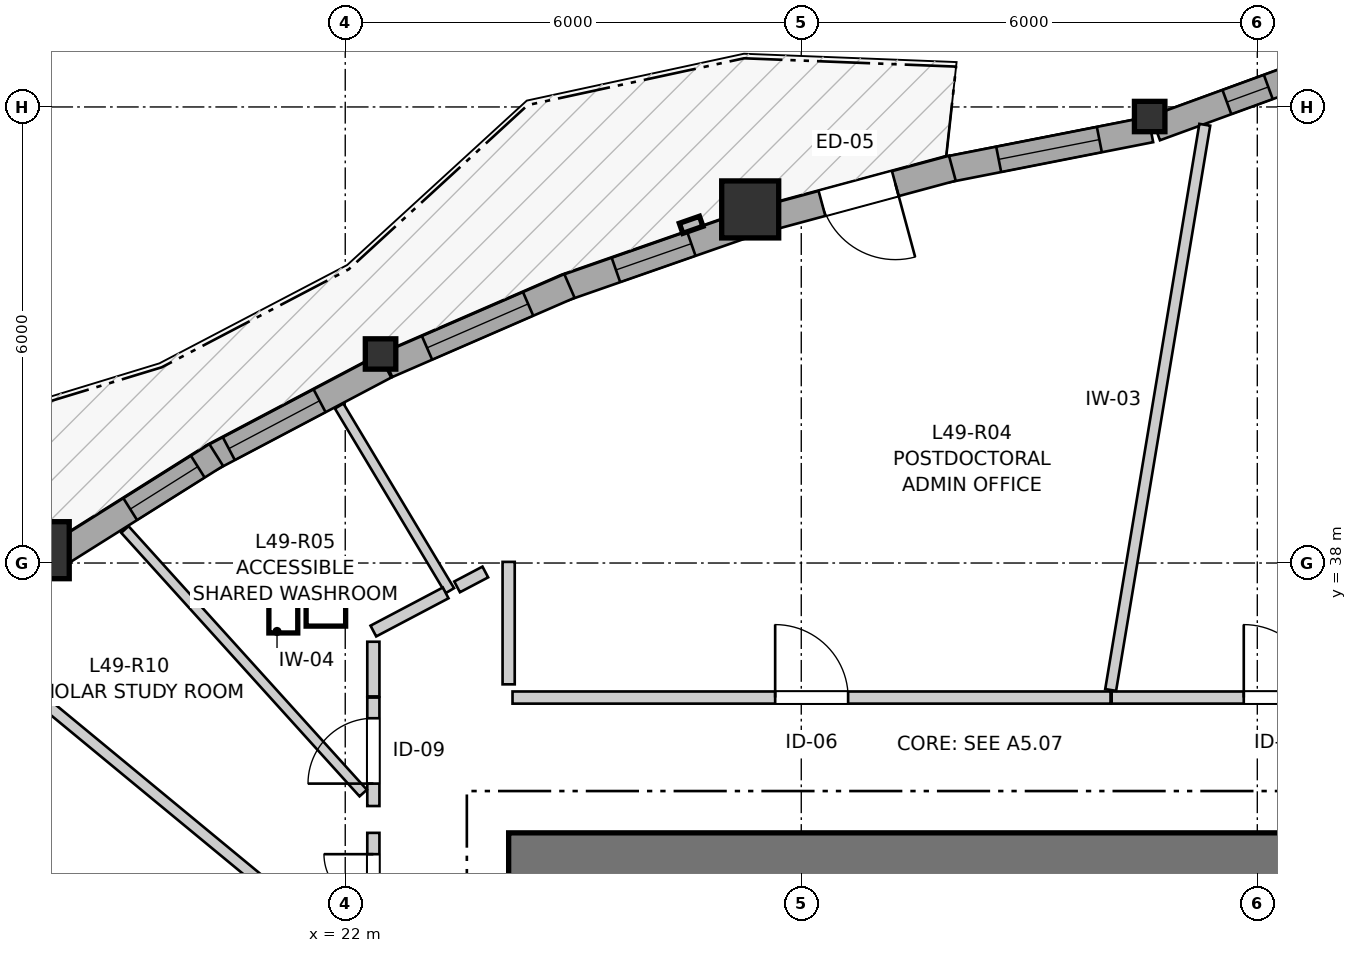
"""IFC4 building model, lengths in metres.
Left out: names, types, materials, properties, quantities, classifications, styles, units other than length and angle.
Written with IfcOpenShell. Run it as: python <this file> out.ifc"""

import sys

from ifc_helpers import new_model, si_unit, direction, frame, frame_2d, origin, origin_2d, place, context, subcontext, project, spatial, rectangle, i_section, extrude, source, transform, mapped, element, fill, save


model = new_model("IFC4")
c1 = context("Model", 3, precision=1e-05, world=origin(), true_north=direction((0.0, 1.0)))
c2 = subcontext(c1, "Body", "Model", "MODEL_VIEW")
j1 = project(units=[si_unit("LENGTHUNIT", "METRE"), si_unit("PLANEANGLEUNIT", "RADIAN")], contexts=[c1])
p1 = place(None, origin())
s1 = spatial("IfcSite", under=j1, at=p1, CompositionType="ELEMENT")
p2 = place(p1, origin())
s2 = spatial("IfcBuilding", under=s1, at=p2, CompositionType="ELEMENT")
p3 = place(p2, frame((0.0, 0.0, 165.0)))
s3 = spatial("IfcBuildingStorey", under=s2, at=p3, CompositionType="ELEMENT", Elevation=165.0)
p4 = place(p3, frame((36.55, 34.125, 0.0), z_axis=(0.0, 0.0, 1.0), x_axis=(-1.0, 0.0, 0.0)))
e1 = element("IfcWall", 1, at=p4, inside=s3, PredefinedType="SHEAR", context=c2, shape_type="SweptSolid", body=[
    extrude(rectangle(XDim=12.4, YDim=0.65, at=frame_2d((6.2, 0.0))), origin(), (0.0, 0.0, 1.0), 2.95),
])
m1 = source(origin(), c2, "Body", "SweptSolid", [
    extrude(i_section(OverallWidth=0.401, OverallDepth=0.399, WebThickness=0.023, FlangeThickness=0.036, FilletRadius=0.015, at=origin_2d()), origin(), (0.0, 0.0, 1.0), 2.95),
])
p5 = place(p3, frame((32.584, 43.874, 0.0), z_axis=(0.0, 0.0, 1.0), x_axis=(1.0, 0.0, 0.0)))
e2 = element("IfcColumn", 2, at=p5, inside=s3, PredefinedType="PILASTER", context=c2, shape_type="MappedRepresentation", body=[
    mapped(m1, transform((0.0, 0.0, 0.0), x_axis=(1.0, 0.0, 0.0), y_axis=(0.0, 1.0, 0.0), z_axis=(0.0, 0.0, 1.0), scale=1.0)),
])
m2 = source(origin(), c2, "Body", "SweptSolid", [
    extrude(rectangle(XDim=0.75, YDim=0.75, at=origin_2d()), origin(), (0.0, 0.0, 1.0), 2.95),
])
p6 = place(p3, frame((27.328, 42.652, 0.0), z_axis=(0.0, 0.0, 1.0), x_axis=(1.0, 0.0, 0.0)))
e3 = element("IfcColumn", 3, at=p6, inside=s3, PredefinedType="COLUMN", context=c2, shape_type="MappedRepresentation", body=[
    mapped(m2, transform((0.0, 0.0, 0.0), x_axis=(1.0, 0.0, 0.0), y_axis=(0.0, 1.0, 0.0), z_axis=(0.0, 0.0, 1.0), scale=1.0)),
])
p7 = place(p3, frame((22.465, 40.75, 0.0), z_axis=(0.0, 0.0, 1.0), x_axis=(1.0, 0.0, 0.0)))
e4 = element("IfcColumn", 4, at=p7, inside=s3, PredefinedType="PILASTER", context=c2, shape_type="MappedRepresentation", body=[
    mapped(m1, transform((0.0, 0.0, 0.0), x_axis=(1.0, 0.0, 0.0), y_axis=(0.0, 1.0, 0.0), z_axis=(0.0, 0.0, 1.0), scale=1.0)),
])
p8 = place(p3, frame((17.994, 38.169, 0.0), z_axis=(0.0, 0.0, 1.0), x_axis=(1.0, 0.0, 0.0)))
e5 = element("IfcColumn", 5, at=p8, inside=s3, PredefinedType="COLUMN", context=c2, shape_type="MappedRepresentation", body=[
    mapped(m2, transform((0.0, 0.0, 0.0), x_axis=(1.0, 0.0, 0.0), y_axis=(0.0, 1.0, 0.0), z_axis=(0.0, 0.0, 1.0), scale=1.0)),
])
p9 = place(p3, frame((34.562, 44.415, 0.0), z_axis=(0.0, 0.0, 1.0), x_axis=(-0.939426417976, -0.342750645819, 0.0)))
e6 = element("IfcWall", 6, at=p9, inside=s3, PredefinedType="SOLIDWALL", context=c2, shape_type="SweptSolid", body=[
    extrude(rectangle(XDim=2.023, YDim=0.34, at=frame_2d((1.011, 0.0))), origin(), (0.0, 0.0, 1.0), 2.53),
])
p10 = place(p9, frame((0.444, 0.0, 0.82)))
e7 = element("IfcOpeningElement", 7, at=p10, cuts=e6, PredefinedType="OPENING", context=c2, shape_type="SweptSolid", body=[
    extrude(rectangle(XDim=0.58, YDim=1.35, at=frame_2d((0.29, 0.675))), frame((0.0, 0.18, 0.0), z_axis=(0.0, -1.0, 0.0), x_axis=(1.0, 0.0, 0.0)), (0.0, 0.0, 1.0), 0.36),
])
p11 = place(p3, frame((32.597, 43.704, 0.0), z_axis=(0.0, 0.0, 1.0), x_axis=(-0.981214876679, -0.192918028667, 0.0)))
e8 = element("IfcWall", 8, at=p11, inside=s3, PredefinedType="SOLIDWALL", context=c2, shape_type="SweptSolid", body=[
    extrude(rectangle(XDim=2.746, YDim=0.34, at=frame_2d((1.373, 0.0))), origin(), (0.0, 0.0, 1.0), 2.53),
])
p12 = place(p11, frame((0.688, 0.0, 0.82)))
e9 = element("IfcOpeningElement", 9, at=p12, cuts=e8, PredefinedType="OPENING", context=c2, shape_type="SweptSolid", body=[
    extrude(rectangle(XDim=1.35, YDim=1.45, at=frame_2d((0.675, 0.725))), frame((0.0, 0.18, 0.0), z_axis=(0.0, -1.0, 0.0), x_axis=(1.0, 0.0, 0.0)), (0.0, 0.0, 1.0), 0.36),
])
p13 = place(p3, frame((29.988, 43.194, 0.0), z_axis=(0.0, 0.0, 1.0), x_axis=(-0.965459623591, -0.26055271101, 0.0)))
e10 = element("IfcWall", 10, at=p13, inside=s3, PredefinedType="SOLIDWALL", context=c2, shape_type="SweptSolid", body=[
    extrude(rectangle(XDim=2.554, YDim=0.34, at=frame_2d((1.277, 0.0))), origin(), (0.0, 0.0, 1.0), 2.53),
])
p14 = place(p13, frame((0.777, 0.0, 0.0)))
e11 = element("IfcOpeningElement", 11, at=p14, cuts=e10, PredefinedType="OPENING", context=c2, shape_type="SweptSolid", body=[
    extrude(rectangle(XDim=1.0, YDim=2.1, at=frame_2d((0.5, 1.05))), frame((0.0, 0.18, 0.0), z_axis=(0.0, -1.0, 0.0), x_axis=(1.0, 0.0, 0.0)), (0.0, 0.0, 1.0), 0.36),
])
p15 = place(p3, frame((27.238, 42.44, 0.0), z_axis=(0.0, 0.0, 1.0), x_axis=(-0.944135459374, -0.329557634341, 0.0)))
e12 = element("IfcWall", 12, at=p15, inside=s3, PredefinedType="SOLIDWALL", context=c2, shape_type="SweptSolid", body=[
    extrude(rectangle(XDim=2.51, YDim=0.34, at=frame_2d((1.255, 0.0))), origin(), (0.0, 0.0, 1.0), 2.53),
])
p16 = place(p15, frame((0.725, 0.0, 0.82)))
e13 = element("IfcOpeningElement", 13, at=p16, cuts=e12, PredefinedType="OPENING", context=c2, shape_type="SweptSolid", body=[
    extrude(rectangle(XDim=1.05, YDim=1.45, at=frame_2d((0.525, 0.725))), frame((0.0, 0.18, 0.0), z_axis=(0.0, -1.0, 0.0), x_axis=(1.0, 0.0, 0.0)), (0.0, 0.0, 1.0), 0.36),
])
p17 = place(p3, frame((24.95, 41.645, 0.0), z_axis=(0.0, 0.0, 1.0), x_axis=(-0.917090826553, -0.398678336322, 0.0)))
e14 = element("IfcWall", 14, at=p17, inside=s3, PredefinedType="SOLIDWALL", context=c2, shape_type="SweptSolid", body=[
    extrude(rectangle(XDim=2.616, YDim=0.34, at=frame_2d((1.308, 0.0))), origin(), (0.0, 0.0, 1.0), 2.53),
])
p18 = place(p17, frame((0.593, 0.0, 0.82)))
e15 = element("IfcOpeningElement", 15, at=p18, cuts=e14, PredefinedType="OPENING", context=c2, shape_type="SweptSolid", body=[
    extrude(rectangle(XDim=1.45, YDim=1.25, at=frame_2d((0.725, 0.625))), frame((0.0, 0.18, 0.0), z_axis=(0.0, -1.0, 0.0), x_axis=(1.0, 0.0, 0.0)), (0.0, 0.0, 1.0), 0.36),
])
p19 = place(p3, frame((22.526, 40.591, 0.0), z_axis=(0.0, 0.0, 1.0), x_axis=(-0.884394438343, -0.46674026763, 0.0)))
e16 = element("IfcWall", 16, at=p19, inside=s3, PredefinedType="SOLIDWALL", context=c2, shape_type="SweptSolid", body=[
    extrude(rectangle(XDim=2.601, YDim=0.34, at=frame_2d((1.301, 0.0))), origin(), (0.0, 0.0, 1.0), 2.53),
])
p20 = place(p19, frame((0.977, 0.0, 0.82)))
e17 = element("IfcOpeningElement", 17, at=p20, cuts=e16, PredefinedType="OPENING", context=c2, shape_type="SweptSolid", body=[
    extrude(rectangle(XDim=1.35, YDim=1.45, at=frame_2d((0.675, 0.725))), frame((0.0, 0.18, 0.0), z_axis=(0.0, -1.0, 0.0), x_axis=(1.0, 0.0, 0.0)), (0.0, 0.0, 1.0), 0.36),
])
p21 = place(p3, frame((20.303, 39.421, 0.0), z_axis=(0.0, 0.0, 1.0), x_axis=(-0.846381586821, -0.532576951707, 0.0)))
e18 = element("IfcWall", 18, at=p21, inside=s3, PredefinedType="SOLIDWALL", context=c2, shape_type="SweptSolid", body=[
    extrude(rectangle(XDim=2.466, YDim=0.34, at=frame_2d((1.233, 0.0))), origin(), (0.0, 0.0, 1.0), 2.53),
])
p22 = place(p21, frame((0.287, 0.0, 0.82)))
e19 = element("IfcOpeningElement", 19, at=p22, cuts=e18, PredefinedType="OPENING", context=c2, shape_type="SweptSolid", body=[
    extrude(rectangle(XDim=1.05, YDim=1.45, at=frame_2d((0.525, 0.725))), frame((0.0, 0.18, 0.0), z_axis=(0.0, -1.0, 0.0), x_axis=(1.0, 0.0, 0.0)), (0.0, 0.0, 1.0), 0.36),
])
p23 = place(p3, frame((24.201, 36.23, 0.0), z_axis=(0.0, 0.0, 1.0), x_axis=(1.0, 0.0, 0.0)))
e20 = element("IfcWall", 20, at=p23, inside=s3, PredefinedType="PARTITIONING", context=c2, shape_type="SweptSolid", body=[
    extrude(rectangle(XDim=7.868, YDim=0.16, at=frame_2d((3.934, 0.0))), origin(), (0.0, 0.0, 1.0), 2.95),
])
p24 = place(p23, frame((3.456, 0.0, 0.0)))
e21 = element("IfcOpeningElement", 21, at=p24, cuts=e20, PredefinedType="OPENING", context=c2, shape_type="SweptSolid", body=[
    extrude(rectangle(XDim=0.96, YDim=2.1, at=frame_2d((0.48, 1.05))), frame((0.0, 0.09, 0.0), z_axis=(0.0, -1.0, 0.0), x_axis=(1.0, 0.0, 0.0)), (0.0, 0.0, 1.0), 0.18),
])
p25 = place(p3, frame((32.084, 36.23, 0.0), z_axis=(0.0, 0.0, 1.0), x_axis=(1.0, 0.0, 0.0)))
e22 = element("IfcWall", 22, at=p25, inside=s3, PredefinedType="PARTITIONING", context=c2, shape_type="SweptSolid", body=[
    extrude(rectangle(XDim=4.466, YDim=0.16, at=frame_2d((2.233, 0.0))), origin(), (0.0, 0.0, 1.0), 2.588),
])
p26 = place(p25, frame((1.738, 0.0, 0.0)))
e23 = element("IfcOpeningElement", 23, at=p26, cuts=e22, PredefinedType="OPENING", context=c2, shape_type="SweptSolid", body=[
    extrude(rectangle(XDim=0.96, YDim=2.1, at=frame_2d((0.48, 1.05))), frame((0.0, 0.09, 0.0), z_axis=(0.0, -1.0, 0.0), x_axis=(1.0, 0.0, 0.0)), (0.0, 0.0, 1.0), 0.18),
])
p27 = place(p3, frame((22.37, 32.624, 0.0), z_axis=(0.0, 0.0, 1.0), x_axis=(0.0, 1.0, 0.0)))
e24 = element("IfcWall", 24, at=p27, inside=s3, PredefinedType="PARTITIONING", context=c2, shape_type="SweptSolid", body=[
    extrude(rectangle(XDim=1.826, YDim=0.16, at=frame_2d((0.913, 0.0))), origin(), (0.0, 0.0, 1.0), 2.95),
])
p28 = place(p27, frame((0.246, 0.0, 0.0)))
e25 = element("IfcOpeningElement", 25, at=p28, cuts=e24, PredefinedType="OPENING", context=c2, shape_type="SweptSolid", body=[
    extrude(rectangle(XDim=1.3, YDim=2.1, at=frame_2d((0.65, 1.05))), frame((0.0, 0.09, 0.0), z_axis=(0.0, -1.0, 0.0), x_axis=(1.0, 0.0, 0.0)), (0.0, 0.0, 1.0), 0.18),
])
p29 = place(p3, frame((22.37, 34.803, 0.0), z_axis=(0.0, 0.0, 1.0), x_axis=(0.0, 1.0, 0.0)))
e26 = element("IfcWall", 26, at=p29, inside=s3, PredefinedType="PARTITIONING", context=c2, shape_type="SweptSolid", body=[
    extrude(rectangle(XDim=1.427, YDim=0.16, at=frame_2d((0.713, 0.0))), origin(), (0.0, 0.0, 1.0), 2.95),
])
p30 = place(p29, frame((0.295, 0.0, 0.0)))
e27 = element("IfcOpeningElement", 27, at=p30, cuts=e26, PredefinedType="OPENING", context=c2, shape_type="SweptSolid", body=[
    extrude(rectangle(XDim=0.86, YDim=2.05, at=frame_2d((0.43, 1.025))), frame((0.0, 0.09, 0.0), z_axis=(0.0, -1.0, 0.0), x_axis=(1.0, 0.0, 0.0)), (0.0, 0.0, 1.0), 0.18),
])
p31 = place(p3, frame((32.071, 36.33, 0.0), z_axis=(0.0, 0.0, 1.0), x_axis=(0.164299199522, 0.986410549942, 0.0)))
e28 = element("IfcWall", 28, at=p31, inside=s3, PredefinedType="PARTITIONING", context=c2, shape_type="SweptSolid", body=[
    extrude(rectangle(XDim=7.538, YDim=0.145, at=frame_2d((3.769, 0.0))), origin(), (0.0, 0.0, 1.0), 2.95),
])
p32 = place(p3, frame((17.028, 37.0, 0.0), z_axis=(0.0, 0.0, 1.0), x_axis=(0.771119105053, -0.636690918596, 0.0)))
e29 = element("IfcWall", 29, at=p32, inside=s3, PredefinedType="PARTITIONING", context=c2, shape_type="SweptSolid", body=[
    extrude(rectangle(XDim=6.756, YDim=0.145, at=frame_2d((3.378, 0.0))), origin(), (0.0, 0.0, 1.0), 2.95),
])
p33 = place(p3, frame((19.101, 38.441, 0.0), z_axis=(0.0, 0.0, 1.0), x_axis=(0.670702711046, -0.741726279295, 0.0)))
e30 = element("IfcWall", 30, at=p33, inside=s3, PredefinedType="PARTITIONING", context=c2, shape_type="SweptSolid", body=[
    extrude(rectangle(XDim=4.675, YDim=0.13, at=frame_2d((2.337, 0.0))), origin(), (0.0, 0.0, 1.0), 2.95),
])
p34 = place(p3, frame((21.92, 40.065, 0.0), z_axis=(0.0, 0.0, 1.0), x_axis=(0.514051974364, -0.857759038223, 0.0)))
e31 = element("IfcWall", 31, at=p34, inside=s3, PredefinedType="PARTITIONING", context=c2, shape_type="SweptSolid", body=[
    extrude(rectangle(XDim=2.832, YDim=0.13, at=frame_2d((1.416, 0.0))), origin(), (0.0, 0.0, 1.0), 2.95),
])
p35 = place(p3, frame((24.15, 36.404, 0.0), z_axis=(0.0, 0.0, 1.0), x_axis=(0.0, 1.0, 0.0)))
e32 = element("IfcWall", 32, at=p35, inside=s3, PredefinedType="PARTITIONING", context=c2, shape_type="SweptSolid", body=[
    extrude(rectangle(XDim=1.611, YDim=0.16, at=frame_2d((0.805, 0.0))), origin(), (0.0, 0.0, 1.0), 2.95),
])
p36 = place(p3, frame((22.37, 37.105, 0.0), z_axis=(0.0, 0.0, 1.0), x_axis=(0.884455008011, 0.466625480234, 0.0)))
e33 = element("IfcWall", 33, at=p36, inside=s3, PredefinedType="PARTITIONING", context=c2, shape_type="SweptSolid", body=[
    extrude(rectangle(XDim=1.076, YDim=0.16, at=frame_2d((0.538, 0.0))), origin(), (0.0, 0.0, 1.0), 2.558),
])
p37 = place(p3, frame((22.37, 36.245, 0.0), z_axis=(0.0, 0.0, 1.0), x_axis=(0.0, 1.0, 0.0)))
e34 = element("IfcWall", 34, at=p37, inside=s3, PredefinedType="PARTITIONING", context=c2, shape_type="SweptSolid", body=[
    extrude(rectangle(XDim=0.719, YDim=0.16, at=frame_2d((0.36, 0.0))), origin(), (0.0, 0.0, 1.0), 2.95),
])
p38 = place(p3, frame((23.472, 37.686, 0.0), z_axis=(0.0, 0.0, 1.0), x_axis=(0.884564737935, 0.466417435782, 0.0)))
e35 = element("IfcWall", 35, at=p38, inside=s3, PredefinedType="PARTITIONING", context=c2, shape_type="SweptSolid", body=[
    extrude(rectangle(XDim=0.42, YDim=0.16, at=frame_2d((0.21, 0.0))), origin(), (0.0, 0.0, 1.0), 2.558),
])
m3 = source(origin(), c2, "Body", "SweptSolid", [
    extrude(rectangle(XDim=0.58, YDim=1.35, at=frame_2d((0.29, 0.675))), frame((0.0, 0.03, 0.0), z_axis=(0.0, -1.0, 0.0), x_axis=(1.0, 0.0, 0.0)), (0.0, 0.0, 1.0), 0.06),
])
p39 = place(p10, origin())
e36 = element("IfcWindow", 36, at=p39, inside=s3, PartitioningType="SINGLE_PANEL", PredefinedType="WINDOW", context=c2, shape_type="MappedRepresentation", body=[
    mapped(m3, transform((0.0, 0.0, 0.0), x_axis=(1.0, 0.0, 0.0), y_axis=(0.0, 1.0, 0.0), z_axis=(0.0, 0.0, 1.0), scale=1.0)),
])
fill(e7, e36)
m4 = source(origin(), c2, "Body", "SweptSolid", [
    extrude(rectangle(XDim=1.35, YDim=1.45, at=frame_2d((0.675, 0.725))), frame((0.0, 0.03, 0.0), z_axis=(0.0, -1.0, 0.0), x_axis=(1.0, 0.0, 0.0)), (0.0, 0.0, 1.0), 0.06),
])
p40 = place(p12, origin())
e37 = element("IfcWindow", 37, at=p40, inside=s3, PartitioningType="SINGLE_PANEL", PredefinedType="WINDOW", context=c2, shape_type="MappedRepresentation", body=[
    mapped(m4, transform((0.0, 0.0, 0.0), x_axis=(1.0, 0.0, 0.0), y_axis=(0.0, 1.0, 0.0), z_axis=(0.0, 0.0, 1.0), scale=1.0)),
])
fill(e9, e37)
m5 = source(origin(), c2, "Body", "SweptSolid", [
    extrude(rectangle(XDim=1.05, YDim=1.45, at=frame_2d((0.525, 0.725))), frame((0.0, 0.03, 0.0), z_axis=(0.0, -1.0, 0.0), x_axis=(1.0, 0.0, 0.0)), (0.0, 0.0, 1.0), 0.06),
])
p41 = place(p16, origin())
e38 = element("IfcWindow", 38, at=p41, inside=s3, PartitioningType="SINGLE_PANEL", PredefinedType="WINDOW", context=c2, shape_type="MappedRepresentation", body=[
    mapped(m5, transform((0.0, 0.0, 0.0), x_axis=(1.0, 0.0, 0.0), y_axis=(0.0, 1.0, 0.0), z_axis=(0.0, 0.0, 1.0), scale=1.0)),
])
fill(e13, e38)
m6 = source(origin(), c2, "Body", "SweptSolid", [
    extrude(rectangle(XDim=1.45, YDim=1.25, at=frame_2d((0.725, 0.625))), frame((0.0, 0.03, 0.0), z_axis=(0.0, -1.0, 0.0), x_axis=(1.0, 0.0, 0.0)), (0.0, 0.0, 1.0), 0.06),
])
p42 = place(p18, origin())
e39 = element("IfcWindow", 39, at=p42, inside=s3, PartitioningType="SINGLE_PANEL", PredefinedType="WINDOW", context=c2, shape_type="MappedRepresentation", body=[
    mapped(m6, transform((0.0, 0.0, 0.0), x_axis=(1.0, 0.0, 0.0), y_axis=(0.0, 1.0, 0.0), z_axis=(0.0, 0.0, 1.0), scale=1.0)),
])
fill(e15, e39)
p43 = place(p20, origin())
e40 = element("IfcWindow", 40, at=p43, inside=s3, PartitioningType="SINGLE_PANEL", PredefinedType="WINDOW", context=c2, shape_type="MappedRepresentation", body=[
    mapped(m4, transform((0.0, 0.0, 0.0), x_axis=(1.0, 0.0, 0.0), y_axis=(0.0, 1.0, 0.0), z_axis=(0.0, 0.0, 1.0), scale=1.0)),
])
fill(e17, e40)
p44 = place(p22, origin())
e41 = element("IfcWindow", 41, at=p44, inside=s3, PartitioningType="SINGLE_PANEL", PredefinedType="WINDOW", context=c2, shape_type="MappedRepresentation", body=[
    mapped(m5, transform((0.0, 0.0, 0.0), x_axis=(1.0, 0.0, 0.0), y_axis=(0.0, 1.0, 0.0), z_axis=(0.0, 0.0, 1.0), scale=1.0)),
])
fill(e19, e41)
m7 = source(origin(), c2, "Body", "SweptSolid", [
    extrude(rectangle(XDim=1.0, YDim=2.1, at=frame_2d((0.5, 1.05))), frame((0.0, 0.025, 0.0), z_axis=(0.0, -1.0, 0.0), x_axis=(1.0, 0.0, 0.0)), (0.0, 0.0, 1.0), 0.05),
])
p45 = place(p14, origin())
e42 = element("IfcDoor", 42, at=p45, inside=s3, OperationType="SINGLE_SWING_LEFT", PredefinedType="DOOR", context=c2, shape_type="MappedRepresentation", body=[
    mapped(m7, transform((0.0, 0.0, 0.0), x_axis=(1.0, 0.0, 0.0), y_axis=(0.0, 1.0, 0.0), z_axis=(0.0, 0.0, 1.0), scale=1.0)),
])
fill(e11, e42)
m8 = source(origin(), c2, "Body", "SweptSolid", [
    extrude(rectangle(XDim=0.96, YDim=2.1, at=frame_2d((0.48, 1.05))), frame((0.0, 0.025, 0.0), z_axis=(0.0, -1.0, 0.0), x_axis=(1.0, 0.0, 0.0)), (0.0, 0.0, 1.0), 0.05),
])
p46 = place(p24, origin())
e43 = element("IfcDoor", 43, at=p46, inside=s3, OperationType="SINGLE_SWING_LEFT", PredefinedType="DOOR", context=c2, shape_type="MappedRepresentation", body=[
    mapped(m8, transform((0.0, 0.0, 0.0), x_axis=(1.0, 0.0, 0.0), y_axis=(0.0, 1.0, 0.0), z_axis=(0.0, 0.0, 1.0), scale=1.0)),
])
fill(e21, e43)
p47 = place(p26, origin())
e44 = element("IfcDoor", 44, at=p47, inside=s3, OperationType="SINGLE_SWING_LEFT", PredefinedType="DOOR", context=c2, shape_type="MappedRepresentation", body=[
    mapped(m8, transform((0.0, 0.0, 0.0), x_axis=(1.0, 0.0, 0.0), y_axis=(0.0, 1.0, 0.0), z_axis=(0.0, 0.0, 1.0), scale=1.0)),
])
fill(e23, e44)
m9 = source(origin(), c2, "Body", "SweptSolid", [
    extrude(rectangle(XDim=1.3, YDim=2.1, at=frame_2d((0.65, 1.05))), frame((0.0, 0.025, 0.0), z_axis=(0.0, -1.0, 0.0), x_axis=(1.0, 0.0, 0.0)), (0.0, 0.0, 1.0), 0.05),
])
p48 = place(p28, origin())
e45 = element("IfcDoor", 45, at=p48, inside=s3, OperationType="DOUBLE_DOOR_SINGLE_SWING", PredefinedType="DOOR", context=c2, shape_type="MappedRepresentation", body=[
    mapped(m9, transform((0.0, 0.0, 0.0), x_axis=(1.0, 0.0, 0.0), y_axis=(0.0, 1.0, 0.0), z_axis=(0.0, 0.0, 1.0), scale=1.0)),
])
fill(e25, e45)
m10 = source(origin(), c2, "Body", "SweptSolid", [
    extrude(rectangle(XDim=0.86, YDim=2.05, at=frame_2d((0.43, 1.025))), frame((0.0, 0.025, 0.0), z_axis=(0.0, -1.0, 0.0), x_axis=(1.0, 0.0, 0.0)), (0.0, 0.0, 1.0), 0.05),
])
p49 = place(p30, origin())
e46 = element("IfcDoor", 46, at=p49, inside=s3, OperationType="SINGLE_SWING_LEFT", PredefinedType="DOOR", context=c2, shape_type="MappedRepresentation", body=[
    mapped(m10, transform((0.0, 0.0, 0.0), x_axis=(1.0, 0.0, 0.0), y_axis=(0.0, 1.0, 0.0), z_axis=(0.0, 0.0, 1.0), scale=1.0)),
])
fill(e27, e46)
save(model, sys.argv[1])
